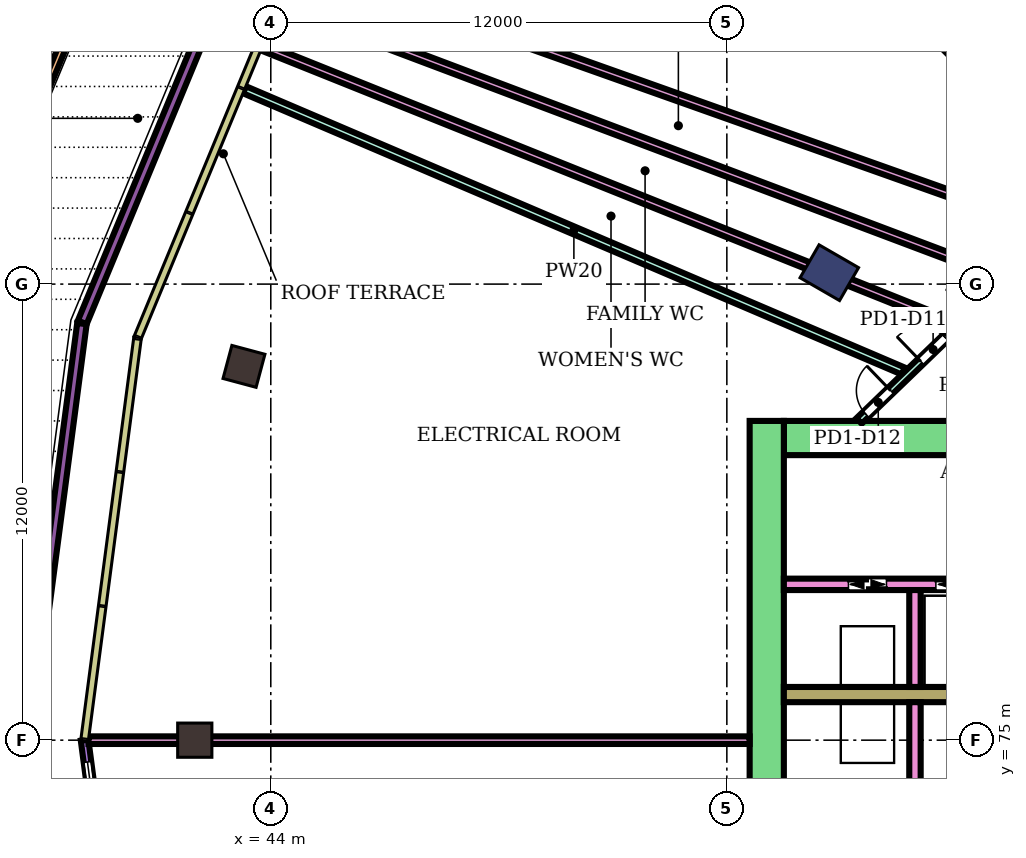
"""IFC4 building model, lengths in metres.
Left out: names, types, materials, properties, quantities, classifications, styles, units other than length and angle.
Written with IfcOpenShell. Run it as: python <this file> out.ifc"""

import sys

from ifc_helpers import new_model, si_unit, direction, frame, frame_2d, origin, origin_2d, place, context, subcontext, project, spatial, rectangle, extrude, element, fill, save


model = new_model("IFC4")
c1 = context("Model", 3, precision=1e-05, world=origin(), true_north=direction((0.0, 1.0)))
c2 = subcontext(c1, "Body", "Model", "MODEL_VIEW")
j1 = project(units=[si_unit("LENGTHUNIT", "METRE"), si_unit("PLANEANGLEUNIT", "RADIAN")], contexts=[c1])
p1 = place(None, origin())
s1 = spatial("IfcSite", under=j1, at=p1, CompositionType="ELEMENT")
p2 = place(p1, origin())
s2 = spatial("IfcBuilding", under=s1, at=p2, CompositionType="ELEMENT")
p3 = place(p2, frame((0.0, 0.0, 7.0)))
s3 = spatial("IfcBuildingStorey", under=s2, at=p3, CompositionType="ELEMENT", Elevation=7.0)
for number, where, z_axis, x_axis in (
    (1, (43.295, 84.835, 0.0), (0.0, 0.0, 1.0), (-0.966, 0.259, 0.0)),
    (2, (42.0, 75.0, 0.0), (0.0, 0.0, 1.0), (-1.0, 0.0, 0.0)),
):
    element("IfcColumn", number, at=place(p3, frame(where, z_axis=z_axis, x_axis=x_axis)), inside=s3, PredefinedType="COLUMN", context=c2, shape_type="SweptSolid", body=[
        extrude(rectangle(XDim=0.9, YDim=0.9, at=origin_2d()), origin(), (0.0, 0.0, 1.0), 5.4),
    ])
p4 = place(p3, frame((58.696, 87.3, 0.0), z_axis=(0.0, 0.0, 1.0), x_axis=(-0.866025403784, 0.5, 0.0)))
e3 = element("IfcColumn", 3, at=p4, inside=s3, PredefinedType="COLUMN", context=c2, shape_type="SweptSolid", body=[
    extrude(rectangle(XDim=1.2, YDim=1.0, at=origin_2d()), origin(), (0.0, 0.0, 1.0), 5.4),
])
p5 = place(p3, frame((72.1, 82.95, 0.0), z_axis=(0.0, 0.0, 1.0), x_axis=(-1.0, 0.0, 0.0)))
e4 = element("IfcWall", 4, at=p5, inside=s3, PredefinedType="SHEAR", context=c2, shape_type="SweptSolid", body=[
    extrude(rectangle(XDim=14.6, YDim=0.9, at=frame_2d((7.3, 0.0))), origin(), (0.0, 0.0, 1.0), 4.95),
])
p6 = place(p5, frame((4.2, 0.0, 0.0)))
e5 = element("IfcOpeningElement", 5, at=p6, cuts=e4, PredefinedType="OPENING", context=c2, shape_type="SweptSolid", body=[
    extrude(rectangle(XDim=2.4, YDim=2.4, at=frame_2d((1.2, 1.2))), frame((0.0, 0.46, 0.0), z_axis=(0.0, -1.0, 0.0), x_axis=(1.0, 0.0, 0.0)), (0.0, 0.0, 1.0), 0.92),
])
p7 = place(p3, frame((57.05, 83.4, 0.0), z_axis=(0.0, 0.0, 1.0), x_axis=(0.0, -1.0, 0.0)))
e6 = element("IfcWall", 6, at=p7, inside=s3, PredefinedType="SHEAR", context=c2, shape_type="SweptSolid", body=[
    extrude(rectangle(XDim=16.8, YDim=0.9, at=frame_2d((8.4, 0.0))), origin(), (0.0, 0.0, 1.0), 4.95),
])
p8 = place(p3, frame((68.3, 76.2, 0.0), z_axis=(0.0, 0.0, 1.0), x_axis=(-1.0, 0.0, 0.0)))
e7 = element("IfcWall", 7, at=p8, inside=s3, PredefinedType="SHEAR", context=c2, shape_type="SweptSolid", body=[
    extrude(rectangle(XDim=10.8, YDim=0.4, at=frame_2d((5.4, 0.0))), origin(), (0.0, 0.0, 1.0), 4.95),
])
p9 = place(p3, frame((68.3, 79.1, 0.0), z_axis=(0.0, 0.0, 1.0), x_axis=(-1.0, 0.0, 0.0)))
e8 = element("IfcWall", 8, at=p9, inside=s3, PredefinedType="SHEAR", context=c2, shape_type="SweptSolid", body=[
    extrude(rectangle(XDim=10.8, YDim=0.3, at=frame_2d((5.4, 0.0))), origin(), (0.0, 0.0, 1.0), 4.95),
])
p10 = place(p9, frame((0.4, 0.0, 0.0)))
e9 = element("IfcOpeningElement", 9, at=p10, cuts=e8, PredefinedType="OPENING", context=c2, shape_type="SweptSolid", body=[
    extrude(rectangle(XDim=1.4, YDim=2.1, at=frame_2d((0.7, 1.05))), frame((0.0, 0.16, 0.0), z_axis=(0.0, -1.0, 0.0), x_axis=(1.0, 0.0, 0.0)), (0.0, 0.0, 1.0), 0.32),
])
p11 = place(p9, frame((5.4, 0.0, 0.0)))
e10 = element("IfcOpeningElement", 10, at=p11, cuts=e8, PredefinedType="OPENING", context=c2, shape_type="SweptSolid", body=[
    extrude(rectangle(XDim=1.4, YDim=2.1, at=frame_2d((0.7, 1.05))), frame((0.0, 0.16, 0.0), z_axis=(0.0, -1.0, 0.0), x_axis=(1.0, 0.0, 0.0)), (0.0, 0.0, 1.0), 0.32),
])
p12 = place(p9, frame((8.1, 0.0, 0.0)))
e11 = element("IfcOpeningElement", 11, at=p12, cuts=e8, PredefinedType="OPENING", context=c2, shape_type="SweptSolid", body=[
    extrude(rectangle(XDim=1.0, YDim=2.1, at=frame_2d((0.5, 1.05))), frame((0.0, 0.16, 0.0), z_axis=(0.0, -1.0, 0.0), x_axis=(1.0, 0.0, 0.0)), (0.0, 0.0, 1.0), 0.32),
])
for number, where, z_axis, x_axis in (
    (12, (60.95, 76.0, 0.0), (0.0, 0.0, 1.0), (0.0, -1.0, 0.0)),
    (13, (60.95, 78.95, 0.0), (0.0, 0.0, 1.0), (0.0, -1.0, 0.0)),
):
    element("IfcWall", number, at=place(p3, frame(where, z_axis=z_axis, x_axis=x_axis)), inside=s3, PredefinedType="SHEAR", context=c2, shape_type="SweptSolid", body=[
        extrude(rectangle(XDim=2.55, YDim=0.3, at=frame_2d((1.275, 0.0))), origin(), (0.0, 0.0, 1.0), 4.95),
    ])
p13 = place(p3, frame((39.101, 75.0, 0.0), z_axis=(0.0, 0.0, 1.0), x_axis=(0.130521944298, -0.991445420614, 0.0)))
e14 = element("IfcWall", 14, at=p13, inside=s3, PredefinedType="NOTDEFINED", context=c2, shape_type="SweptSolid", body=[
    extrude(rectangle(XDim=10.677, YDim=0.2, at=frame_2d((5.338, 0.0))), origin(), (0.0, 0.0, 1.0), 5.4),
])
p14 = place(p13, frame((0.58, 0.0, 0.9)))
e15 = element("IfcOpeningElement", 15, at=p14, cuts=e14, PredefinedType="OPENING", context=c2, shape_type="SweptSolid", body=[
    extrude(rectangle(XDim=2.4, YDim=2.4, at=frame_2d((1.2, 1.2))), frame((0.0, 0.11, 0.0), z_axis=(0.0, -1.0, 0.0), x_axis=(1.0, 0.0, 0.0)), (0.0, 0.0, 1.0), 0.22),
])
p15 = place(p13, frame((4.438, 0.0, 0.0)))
e16 = element("IfcOpeningElement", 16, at=p15, cuts=e14, PredefinedType="OPENING", context=c2, shape_type="SweptSolid", body=[
    extrude(rectangle(XDim=1.8, YDim=2.4, at=frame_2d((0.9, 1.2))), frame((0.0, 0.11, 0.0), z_axis=(0.0, -1.0, 0.0), x_axis=(1.0, 0.0, 0.0)), (0.0, 0.0, 1.0), 0.22),
])
p16 = place(p13, frame((7.697, 0.0, 0.9)))
e17 = element("IfcOpeningElement", 17, at=p16, cuts=e14, PredefinedType="OPENING", context=c2, shape_type="SweptSolid", body=[
    extrude(rectangle(XDim=2.4, YDim=2.4, at=frame_2d((1.2, 1.2))), frame((0.0, 0.11, 0.0), z_axis=(0.0, -1.0, 0.0), x_axis=(1.0, 0.0, 0.0)), (0.0, 0.0, 1.0), 0.22),
])
p17 = place(p3, frame((35.865, 86.84, 0.0), z_axis=(0.0, 0.0, 1.0), x_axis=(0.382693560434, 0.923875337263, 0.0)))
e18 = element("IfcWall", 18, at=p17, inside=s3, PredefinedType="PARAPET", context=c2, shape_type="SweptSolid", body=[
    extrude(rectangle(XDim=11.903, YDim=0.2, at=frame_2d((5.951, 0.0))), origin(), (0.0, 0.0, 1.0), 1.1),
])
p18 = place(p3, frame((37.588, 75.0, 0.0), z_axis=(0.0, 0.0, 1.0), x_axis=(0.130536201932, 0.991443543519, 0.0)))
e19 = element("IfcWall", 19, at=p18, inside=s3, PredefinedType="USERDEFINED", context=c2, shape_type="SweptSolid", body=[
    extrude(rectangle(XDim=11.055, YDim=0.25, at=frame_2d((5.528, 0.0))), origin(), (0.0, 0.0, 1.0), 0.6),
])
p19 = place(p3, frame((39.039, 85.992, 0.0), z_axis=(0.0, 0.0, 1.0), x_axis=(0.382676686443, 0.923882326735, 0.0)))
e20 = element("IfcWall", 20, at=p19, inside=s3, PredefinedType="USERDEFINED", context=c2, shape_type="SweptSolid", body=[
    extrude(rectangle(XDim=11.039, YDim=0.25, at=frame_2d((5.52, 0.0))), origin(), (0.0, 0.0, 1.0), 0.6),
])
p20 = place(p3, frame((39.031, 64.039, 0.0), z_axis=(0.0, 0.0, 1.0), x_axis=(-0.130536201932, 0.991443543519, 0.0)))
e21 = element("IfcWall", 21, at=p20, inside=s3, PredefinedType="USERDEFINED", context=c2, shape_type="SweptSolid", body=[
    extrude(rectangle(XDim=11.055, YDim=0.25, at=frame_2d((5.528, 0.0))), origin(), (0.0, 0.0, 1.0), 0.6),
])
p21 = place(p3, frame((39.204, 75.0, 0.0), z_axis=(0.0, 0.0, 1.0), x_axis=(1.0, 0.0, 0.0)))
e22 = element("IfcWall", 22, at=p21, inside=s3, PredefinedType="PARTITIONING", context=c2, shape_type="SweptSolid", body=[
    extrude(rectangle(XDim=17.394, YDim=0.2, at=frame_2d((8.697, 0.0))), origin(), (0.0, 0.0, 1.0), 3.35),
])
p22 = place(p3, frame((43.308, 92.114, 0.0), z_axis=(0.0, 0.0, 1.0), x_axis=(0.919685506152, -0.39265579045, 0.0)))
e23 = element("IfcWall", 23, at=p22, inside=s3, PredefinedType="PARTITIONING", context=c2, shape_type="SweptSolid", body=[
    extrude(rectangle(XDim=18.848, YDim=0.2, at=frame_2d((9.424, 0.0))), origin(), (0.0, 0.0, 1.0), 4.95),
])
p23 = place(p3, frame((43.775, 93.243, 0.0), z_axis=(0.0, 0.0, 1.0), x_axis=(0.928161429734, -0.372177861181, 0.0)))
e24 = element("IfcWall", 24, at=p23, inside=s3, PredefinedType="PARTITIONING", context=c2, shape_type="SweptSolid", body=[
    extrude(rectangle(XDim=19.568, YDim=0.2, at=frame_2d((9.784, 0.0))), origin(), (0.0, 0.0, 1.0), 3.35),
])
p24 = place(p3, frame((44.238, 94.363, 0.0), z_axis=(0.0, 0.0, 1.0), x_axis=(0.935745518328, -0.352675948896, 0.0)))
e25 = element("IfcWall", 25, at=p24, inside=s3, PredefinedType="PARTITIONING", context=c2, shape_type="SweptSolid", body=[
    extrude(rectangle(XDim=20.295, YDim=0.2, at=frame_2d((10.147, 0.0))), origin(), (0.0, 0.0, 1.0), 3.35),
])
p25 = place(p3, frame((44.719, 95.463, 0.0), z_axis=(0.0, 0.0, 1.0), x_axis=(0.94231036805, -0.33474045209, 0.0)))
e26 = element("IfcWall", 26, at=p25, inside=s3, PredefinedType="PARTITIONING", context=c2, shape_type="SweptSolid", body=[
    extrude(rectangle(XDim=20.987, YDim=0.2, at=frame_2d((10.493, 0.0))), origin(), (0.0, 0.0, 1.0), 3.35),
])
p26 = place(p3, frame((51.152, 103.848, 0.0), z_axis=(0.0, 0.0, 1.0), x_axis=(0.707106781187, -0.707106781187, 0.0)))
e27 = element("IfcWall", 27, at=p26, inside=s3, PredefinedType="PARTITIONING", context=c2, shape_type="SweptSolid", body=[
    extrude(rectangle(XDim=23.993, YDim=0.2, at=frame_2d((11.997, 0.0))), origin(), (0.0, 0.0, 1.0), 3.35),
])
p27 = place(p3, frame((59.48, 83.4, 0.0), z_axis=(0.0, 0.0, 1.0), x_axis=(0.71978771682, 0.694194239903, 0.0)))
e28 = element("IfcWall", 28, at=p27, inside=s3, PredefinedType="PARTITIONING", context=c2, shape_type="SweptSolid", body=[
    extrude(rectangle(XDim=8.471, YDim=0.2, at=frame_2d((4.235, 0.0))), origin(), (0.0, 0.0, 1.0), 4.95),
])
p28 = place(p27, frame((7.413, 0.0, 0.0)))
e29 = element("IfcOpeningElement", 29, at=p28, cuts=e28, PredefinedType="OPENING", context=c2, shape_type="SweptSolid", body=[
    extrude(rectangle(XDim=0.9, YDim=2.1, at=frame_2d((0.45, 1.05))), frame((0.0, 0.11, 0.0), z_axis=(0.0, -1.0, 0.0), x_axis=(1.0, 0.0, 0.0)), (0.0, 0.0, 1.0), 0.22),
])
p29 = place(p27, frame((5.84, 0.0, 0.0)))
e30 = element("IfcOpeningElement", 30, at=p29, cuts=e28, PredefinedType="OPENING", context=c2, shape_type="SweptSolid", body=[
    extrude(rectangle(XDim=0.9, YDim=2.1, at=frame_2d((0.45, 1.05))), frame((0.0, 0.11, 0.0), z_axis=(0.0, -1.0, 0.0), x_axis=(1.0, 0.0, 0.0)), (0.0, 0.0, 1.0), 0.22),
])
p30 = place(p27, frame((4.055, 0.0, 0.0)))
e31 = element("IfcOpeningElement", 31, at=p30, cuts=e28, PredefinedType="OPENING", context=c2, shape_type="SweptSolid", body=[
    extrude(rectangle(XDim=0.9, YDim=2.1, at=frame_2d((0.45, 1.05))), frame((0.0, 0.11, 0.0), z_axis=(0.0, -1.0, 0.0), x_axis=(1.0, 0.0, 0.0)), (0.0, 0.0, 1.0), 0.22),
])
p31 = place(p27, frame((2.256, 0.0, 0.0)))
e32 = element("IfcOpeningElement", 32, at=p31, cuts=e28, PredefinedType="OPENING", context=c2, shape_type="SweptSolid", body=[
    extrude(rectangle(XDim=0.9, YDim=2.1, at=frame_2d((0.45, 1.05))), frame((0.0, 0.11, 0.0), z_axis=(0.0, -1.0, 0.0), x_axis=(1.0, 0.0, 0.0)), (0.0, 0.0, 1.0), 0.22),
])
p32 = place(p27, frame((0.251, 0.0, 0.0)))
e33 = element("IfcOpeningElement", 33, at=p32, cuts=e28, PredefinedType="OPENING", context=c2, shape_type="SweptSolid", body=[
    extrude(rectangle(XDim=0.9, YDim=2.1, at=frame_2d((0.45, 1.05))), frame((0.0, 0.11, 0.0), z_axis=(0.0, -1.0, 0.0), x_axis=(1.0, 0.0, 0.0)), (0.0, 0.0, 1.0), 0.22),
])
p33 = place(p3, frame((59.601, 110.333, 0.0), z_axis=(0.0, 0.0, 1.0), x_axis=(0.499979991004, -0.866036955676, 0.0)))
e34 = element("IfcWall", 34, at=p33, inside=s3, PredefinedType="PARTITIONING", context=c2, shape_type="SweptSolid", body=[
    extrude(rectangle(XDim=23.497, YDim=0.2, at=frame_2d((11.748, 0.0))), origin(), (0.0, 0.0, 1.0), 3.35),
])
p34 = place(p14, origin())
e35 = element("IfcWindow", 35, at=p34, inside=s3, PartitioningType="SINGLE_PANEL", PredefinedType="WINDOW", context=c2, shape_type="SweptSolid", body=[
    extrude(rectangle(XDim=2.4, YDim=2.4, at=frame_2d((1.2, 1.2))), frame((0.0, 0.03, 0.0), z_axis=(0.0, -1.0, 0.0), x_axis=(1.0, 0.0, 0.0)), (0.0, 0.0, 1.0), 0.06),
])
fill(e15, e35)
p35 = place(p31, origin())
e36 = element("IfcDoor", 36, at=p35, inside=s3, OperationType="SINGLE_SWING_LEFT", PredefinedType="DOOR", context=c2, shape_type="SweptSolid", body=[
    extrude(rectangle(XDim=0.9, YDim=2.1, at=frame_2d((0.45, 1.05))), frame((0.0, 0.025, 0.0), z_axis=(0.0, -1.0, 0.0), x_axis=(1.0, 0.0, 0.0)), (0.0, 0.0, 1.0), 0.05),
])
fill(e32, e36)
p36 = place(p32, origin())
e37 = element("IfcDoor", 37, at=p36, inside=s3, OperationType="SINGLE_SWING_RIGHT", PredefinedType="DOOR", context=c2, shape_type="SweptSolid", body=[
    extrude(rectangle(XDim=0.9, YDim=2.1, at=frame_2d((0.45, 1.05))), frame((0.0, 0.025, 0.0), z_axis=(0.0, -1.0, 0.0), x_axis=(1.0, 0.0, 0.0)), (0.0, 0.0, 1.0), 0.05),
])
fill(e33, e37)
p37 = place(p11, origin())
e38 = element("IfcDoor", 38, at=p37, inside=s3, OperationType="DOUBLE_DOOR_SLIDING", PredefinedType="DOOR", context=c2, shape_type="SweptSolid", body=[
    extrude(rectangle(XDim=1.4, YDim=2.1, at=frame_2d((0.7, 1.05))), frame((0.0, 0.025, 0.0), z_axis=(0.0, -1.0, 0.0), x_axis=(1.0, 0.0, 0.0)), (0.0, 0.0, 1.0), 0.05),
])
fill(e10, e38)
p38 = place(p12, origin())
e39 = element("IfcDoor", 39, at=p38, inside=s3, OperationType="DOUBLE_DOOR_SLIDING", PredefinedType="DOOR", context=c2, shape_type="SweptSolid", body=[
    extrude(rectangle(XDim=1.0, YDim=2.1, at=frame_2d((0.5, 1.05))), frame((0.0, 0.025, 0.0), z_axis=(0.0, -1.0, 0.0), x_axis=(1.0, 0.0, 0.0)), (0.0, 0.0, 1.0), 0.05),
])
fill(e11, e39)
save(model, sys.argv[1])
